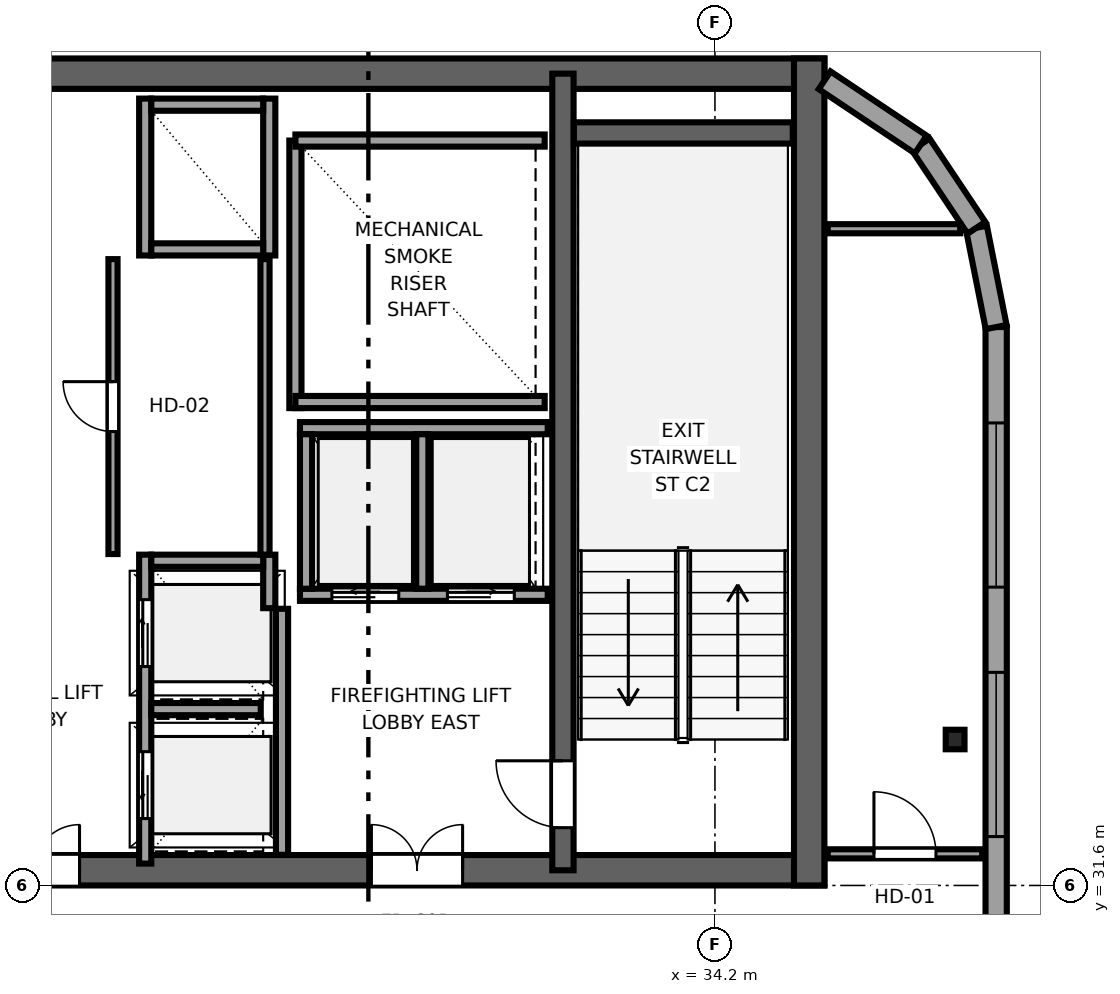
"""IFC4 building model, lengths in metres.
Left out: names, types, materials, properties, quantities, classifications, styles, units other than length and angle.
Written with IfcOpenShell. Run it as: python <this file> out.ifc"""

import sys

from ifc_helpers import new_model, si_unit, direction, frame, frame_2d, origin, origin_2d, place, context, subcontext, project, spatial, rectangle, i_section, extrude, source, transform, mapped, element, fill, save


model = new_model("IFC4")
c1 = context("Model", 3, precision=1e-05, world=origin(), true_north=direction((0.0, 1.0)))
c2 = subcontext(c1, "Body", "Model", "MODEL_VIEW")
j1 = project(units=[si_unit("LENGTHUNIT", "METRE"), si_unit("PLANEANGLEUNIT", "RADIAN")], contexts=[c1])
p1 = place(None, origin())
s1 = spatial("IfcSite", under=j1, at=p1, CompositionType="ELEMENT")
p2 = place(p1, origin())
s2 = spatial("IfcBuilding", under=s1, at=p2, CompositionType="ELEMENT")
p3 = place(p2, frame((0.0, 0.0, 266.5)))
s3 = spatial("IfcBuildingStorey", under=s2, at=p3, CompositionType="ELEMENT", Elevation=266.5)
p4 = place(p3, frame((10.0, 31.85, 0.0), z_axis=(0.0, 0.0, 1.0), x_axis=(1.0, 0.0, 0.0)))
e1 = element("IfcWall", 1, at=p4, inside=s3, PredefinedType="SHEAR", context=c2, shape_type="SweptSolid", body=[
    extrude(rectangle(XDim=26.0, YDim=0.5, at=frame_2d((13.0, 0.0))), origin(), (0.0, 0.0, 1.0), 3.55),
])
p5 = place(p4, frame((7.45, 0.0, 0.0), z_axis=(0.0, 0.0, 1.0), x_axis=(-1.0, 0.0, 0.0)))
e2 = element("IfcOpeningElement", 2, at=p5, cuts=e1, PredefinedType="OPENING", context=c2, shape_type="SweptSolid", body=[
    extrude(rectangle(XDim=1.5, YDim=2.04, at=frame_2d((0.75, 1.02))), frame((0.0, 0.26, 0.0), z_axis=(0.0, -1.0, 0.0), x_axis=(1.0, 0.0, 0.0)), (0.0, 0.0, 1.0), 0.52),
])
p6 = place(p4, frame((13.75, 0.0, 0.0), z_axis=(0.0, 0.0, 1.0), x_axis=(-1.0, 0.0, 0.0)))
e3 = element("IfcOpeningElement", 3, at=p6, cuts=e1, PredefinedType="OPENING", context=c2, shape_type="SweptSolid", body=[
    extrude(rectangle(XDim=1.5, YDim=2.04, at=frame_2d((0.75, 1.02))), frame((0.0, 0.26, 0.0), z_axis=(0.0, -1.0, 0.0), x_axis=(1.0, 0.0, 0.0)), (0.0, 0.0, 1.0), 0.52),
])
p7 = place(p4, frame((20.05, 0.0, 0.0), z_axis=(0.0, 0.0, 1.0), x_axis=(-1.0, 0.0, 0.0)))
e4 = element("IfcOpeningElement", 4, at=p7, cuts=e1, PredefinedType="OPENING", context=c2, shape_type="SweptSolid", body=[
    extrude(rectangle(XDim=1.5, YDim=2.04, at=frame_2d((0.75, 1.02))), frame((0.0, 0.26, 0.0), z_axis=(0.0, -1.0, 0.0), x_axis=(1.0, 0.0, 0.0)), (0.0, 0.0, 1.0), 0.52),
])
p8 = place(p3, frame((10.0, 44.95, 0.0), z_axis=(0.0, 0.0, 1.0), x_axis=(1.0, 0.0, 0.0)))
e5 = element("IfcWall", 5, at=p8, inside=s3, PredefinedType="SHEAR", context=c2, shape_type="SweptSolid", body=[
    extrude(rectangle(XDim=26.0, YDim=0.5, at=frame_2d((13.0, 0.0))), origin(), (0.0, 0.0, 1.0), 3.55),
])
p9 = place(p3, frame((35.75, 31.6, 0.0), z_axis=(0.0, 0.0, 1.0), x_axis=(0.0, 1.0, 0.0)))
e6 = element("IfcWall", 6, at=p9, inside=s3, PredefinedType="SHEAR", context=c2, shape_type="SweptSolid", body=[
    extrude(rectangle(XDim=13.6, YDim=0.5, at=frame_2d((6.8, 0.0))), origin(), (0.0, 0.0, 1.0), 3.55),
])
p10 = place(p3, frame((31.7, 31.85, 0.0), z_axis=(0.0, 0.0, 1.0), x_axis=(0.0, 1.0, 0.0)))
e7 = element("IfcWall", 7, at=p10, inside=s3, PredefinedType="SHEAR", context=c2, shape_type="SweptSolid", body=[
    extrude(rectangle(XDim=13.1, YDim=0.35, at=frame_2d((6.55, 0.0))), origin(), (0.0, 0.0, 1.0), 3.55),
])
p11 = place(p10, frame((1.8, 0.0, 0.0), z_axis=(0.0, 0.0, 1.0), x_axis=(-1.0, 0.0, 0.0)))
e8 = element("IfcOpeningElement", 8, at=p11, cuts=e7, PredefinedType="OPENING", context=c2, shape_type="SweptSolid", body=[
    extrude(rectangle(XDim=1.1, YDim=2.12, at=frame_2d((0.55, 1.06))), frame((0.0, 0.185, 0.0), z_axis=(0.0, -1.0, 0.0), x_axis=(1.0, 0.0, 0.0)), (0.0, 0.0, 1.0), 0.37),
])
p12 = place(p3, frame((31.88, 43.975, 0.0), z_axis=(0.0, 0.0, 1.0), x_axis=(1.0, 0.0, 0.0)))
e9 = element("IfcWall", 9, at=p12, inside=s3, PredefinedType="SHEAR", context=c2, shape_type="SweptSolid", body=[
    extrude(rectangle(XDim=3.6, YDim=0.35, at=frame_2d((1.8, 0.0))), origin(), (0.0, 0.0, 1.0), 3.55),
])
m1 = source(origin(), c2, "Body", "SweptSolid", [
    extrude(i_section(OverallWidth=0.309, OverallDepth=0.321, WebThickness=0.014, FlangeThickness=0.022, FilletRadius=0.017, at=origin_2d()), origin(), (0.0, 0.0, 1.0), 3.55),
])
p13 = place(p3, frame((38.15, 34.0, 0.0), z_axis=(0.0, 0.0, 1.0), x_axis=(1.0, 0.0, 0.0)))
e10 = element("IfcColumn", 10, at=p13, inside=s3, PredefinedType="COLUMN", context=c2, shape_type="MappedRepresentation", body=[
    mapped(m1, transform((0.0, 0.0, 0.0), x_axis=(1.0, 0.0, 0.0), y_axis=(0.0, 1.0, 0.0), z_axis=(0.0, 0.0, 1.0), scale=1.0)),
])
p14 = place(p3, frame((38.825, 7.017, 0.0), z_axis=(0.0, 0.0, 1.0), x_axis=(0.0, 1.0, 0.0)))
e11 = element("IfcWall", 11, at=p14, inside=s3, PredefinedType="SOLIDWALL", context=c2, shape_type="SweptSolid", body=[
    extrude(rectangle(XDim=33.766, YDim=0.35, at=frame_2d((16.883, 0.0))), origin(), (0.0, 0.0, 1.0), 3.25),
])
p15 = place(p14, frame((1.576, 0.0, 0.68)))
e12 = element("IfcOpeningElement", 12, at=p15, cuts=e11, PredefinedType="OPENING", context=c2, shape_type="SweptSolid", body=[
    extrude(rectangle(XDim=2.7, YDim=1.95, at=frame_2d((1.35, 0.975))), frame((0.0, 0.185, 0.0), z_axis=(0.0, -1.0, 0.0), x_axis=(1.0, 0.0, 0.0)), (0.0, 0.0, 1.0), 0.37),
])
p16 = place(p14, frame((6.228, 0.0, 0.68)))
e13 = element("IfcOpeningElement", 13, at=p16, cuts=e11, PredefinedType="OPENING", context=c2, shape_type="SweptSolid", body=[
    extrude(rectangle(XDim=2.7, YDim=1.95, at=frame_2d((1.35, 0.975))), frame((0.0, 0.185, 0.0), z_axis=(0.0, -1.0, 0.0), x_axis=(1.0, 0.0, 0.0)), (0.0, 0.0, 1.0), 0.37),
])
p17 = place(p14, frame((10.881, 0.0, 0.68)))
e14 = element("IfcOpeningElement", 14, at=p17, cuts=e11, PredefinedType="OPENING", context=c2, shape_type="SweptSolid", body=[
    extrude(rectangle(XDim=2.7, YDim=1.95, at=frame_2d((1.35, 0.975))), frame((0.0, 0.185, 0.0), z_axis=(0.0, -1.0, 0.0), x_axis=(1.0, 0.0, 0.0)), (0.0, 0.0, 1.0), 0.37),
])
p18 = place(p14, frame((15.533, 0.0, 0.68)))
e15 = element("IfcOpeningElement", 15, at=p18, cuts=e11, PredefinedType="OPENING", context=c2, shape_type="SweptSolid", body=[
    extrude(rectangle(XDim=2.7, YDim=1.95, at=frame_2d((1.35, 0.975))), frame((0.0, 0.185, 0.0), z_axis=(0.0, -1.0, 0.0), x_axis=(1.0, 0.0, 0.0)), (0.0, 0.0, 1.0), 0.37),
])
p19 = place(p14, frame((20.185, 0.0, 0.68)))
e16 = element("IfcOpeningElement", 16, at=p19, cuts=e11, PredefinedType="OPENING", context=c2, shape_type="SweptSolid", body=[
    extrude(rectangle(XDim=2.7, YDim=1.95, at=frame_2d((1.35, 0.975))), frame((0.0, 0.185, 0.0), z_axis=(0.0, -1.0, 0.0), x_axis=(1.0, 0.0, 0.0)), (0.0, 0.0, 1.0), 0.37),
])
p20 = place(p14, frame((25.387, 0.0, 0.68)))
e17 = element("IfcOpeningElement", 17, at=p20, cuts=e11, PredefinedType="OPENING", context=c2, shape_type="SweptSolid", body=[
    extrude(rectangle(XDim=2.7, YDim=1.95, at=frame_2d((1.35, 0.975))), frame((0.0, 0.185, 0.0), z_axis=(0.0, -1.0, 0.0), x_axis=(1.0, 0.0, 0.0)), (0.0, 0.0, 1.0), 0.37),
])
p21 = place(p14, frame((29.489, 0.0, 0.68)))
e18 = element("IfcOpeningElement", 18, at=p21, cuts=e11, PredefinedType="OPENING", context=c2, shape_type="SweptSolid", body=[
    extrude(rectangle(XDim=2.7, YDim=1.95, at=frame_2d((1.35, 0.975))), frame((0.0, 0.185, 0.0), z_axis=(0.0, -1.0, 0.0), x_axis=(1.0, 0.0, 0.0)), (0.0, 0.0, 1.0), 0.37),
])
p22 = place(p3, frame((38.825, 40.783, 0.0), z_axis=(0.0, 0.0, 1.0), x_axis=(-0.195044345786, 0.980794424524, 0.0)))
e19 = element("IfcWall", 19, at=p22, inside=s3, PredefinedType="SOLIDWALL", context=c2, shape_type="SweptSolid", body=[
    extrude(rectangle(XDim=1.665, YDim=0.35, at=frame_2d((0.833, 0.0))), origin(), (0.0, 0.0, 1.0), 3.25),
])
p23 = place(p3, frame((38.5, 42.416, 0.0), z_axis=(0.0, 0.0, 1.0), x_axis=(-0.555520825599, 0.831502623162, 0.0)))
e20 = element("IfcWall", 20, at=p23, inside=s3, PredefinedType="SOLIDWALL", context=c2, shape_type="SweptSolid", body=[
    extrude(rectangle(XDim=1.647, YDim=0.35, at=frame_2d((0.824, 0.0))), origin(), (0.0, 0.0, 1.0), 3.25),
])
p24 = place(p3, frame((37.585, 43.785, 0.0), z_axis=(0.0, 0.0, 1.0), x_axis=(-0.831516639465, 0.555499845448, 0.0)))
e21 = element("IfcWall", 21, at=p24, inside=s3, PredefinedType="SOLIDWALL", context=c2, shape_type="SweptSolid", body=[
    extrude(rectangle(XDim=1.902, YDim=0.35, at=frame_2d((0.951, 0.0))), origin(), (0.0, 0.0, 1.0), 3.25),
])
p25 = place(p3, frame((27.3, 39.45, 0.0), z_axis=(0.0, 0.0, 1.0), x_axis=(0.0, 1.0, 0.0)))
e22 = element("IfcWall", 22, at=p25, inside=s3, PredefinedType="SOLIDWALL", context=c2, shape_type="SweptSolid", body=[
    extrude(rectangle(XDim=4.4, YDim=0.2, at=frame_2d((2.2, 0.0))), origin(), (0.0, 0.0, 1.0), 3.25),
])
for number, where, z_axis, x_axis in (
    (23, (27.3, 39.55, 0.0), (0.0, 0.0, 1.0), (1.0, 0.0, 0.0)),
    (24, (27.3, 43.85, 0.0), (0.0, 0.0, 1.0), (1.0, 0.0, 0.0)),
):
    element("IfcWall", number, at=place(p3, frame(where, z_axis=z_axis, x_axis=x_axis)), inside=s3, PredefinedType="SOLIDWALL", context=c2, shape_type="SweptSolid", body=[
        extrude(rectangle(XDim=4.1, YDim=0.2, at=frame_2d((2.05, 0.0))), origin(), (0.0, 0.0, 1.0), 3.25),
    ])
p26 = place(p3, frame((27.08, 32.104, 0.0), z_axis=(0.0, 0.0, 1.0), x_axis=(0.0, 1.0, 0.0)))
e25 = element("IfcWall", 25, at=p26, inside=s3, PredefinedType="SOLIDWALL", context=c2, shape_type="SweptSolid", body=[
    extrude(rectangle(XDim=4.046, YDim=0.2, at=frame_2d((2.023, 0.0))), origin(), (0.0, 0.0, 1.0), 3.25),
])
p27 = place(p3, frame((27.375, 36.38, 0.0), z_axis=(0.0, 0.0, 1.0), x_axis=(1.0, 0.0, 0.0)))
e26 = element("IfcWall", 26, at=p27, inside=s3, PredefinedType="SOLIDWALL", context=c2, shape_type="SweptSolid", body=[
    extrude(rectangle(XDim=4.075, YDim=0.2, at=frame_2d((2.038, 0.0))), origin(), (0.0, 0.0, 1.0), 3.25),
])
p28 = place(p27, frame((0.525, 0.0, 0.0)))
e27 = element("IfcOpeningElement", 27, at=p28, cuts=e26, PredefinedType="OPENING", context=c2, shape_type="SweptSolid", body=[
    extrude(rectangle(XDim=1.1, YDim=2.12, at=frame_2d((0.55, 1.06))), frame((0.0, 0.11, 0.0), z_axis=(0.0, -1.0, 0.0), x_axis=(1.0, 0.0, 0.0)), (0.0, 0.0, 1.0), 0.22),
])
p29 = place(p27, frame((2.425, 0.0, 0.0)))
e28 = element("IfcOpeningElement", 28, at=p29, cuts=e26, PredefinedType="OPENING", context=c2, shape_type="SweptSolid", body=[
    extrude(rectangle(XDim=1.1, YDim=2.12, at=frame_2d((0.55, 1.06))), frame((0.0, 0.11, 0.0), z_axis=(0.0, -1.0, 0.0), x_axis=(1.0, 0.0, 0.0)), (0.0, 0.0, 1.0), 0.22),
])
p30 = place(p3, frame((27.375, 39.12, 0.0), z_axis=(0.0, 0.0, 1.0), x_axis=(1.0, 0.0, 0.0)))
e29 = element("IfcWall", 29, at=p30, inside=s3, PredefinedType="SOLIDWALL", context=c2, shape_type="SweptSolid", body=[
    extrude(rectangle(XDim=4.075, YDim=0.2, at=frame_2d((2.038, 0.0))), origin(), (0.0, 0.0, 1.0), 3.25),
])
for number, where, z_axis, x_axis in (
    (30, (27.475, 36.48, 0.0), (0.0, 0.0, 1.0), (0.0, 1.0, 0.0)),
    (31, (29.387, 36.48, 0.0), (0.0, 0.0, 1.0), (0.0, 1.0, 0.0)),
):
    element("IfcWall", number, at=place(p3, frame(where, z_axis=z_axis, x_axis=x_axis)), inside=s3, PredefinedType="SOLIDWALL", context=c2, shape_type="SweptSolid", body=[
        extrude(rectangle(XDim=2.54, YDim=0.2, at=frame_2d((1.27, 0.0))), origin(), (0.0, 0.0, 1.0), 3.25),
    ])
p31 = place(p3, frame((24.83, 31.96, 0.0), z_axis=(0.0, 0.0, 1.0), x_axis=(0.0, 1.0, 0.0)))
e32 = element("IfcWall", 32, at=p31, inside=s3, PredefinedType="SOLIDWALL", context=c2, shape_type="SweptSolid", body=[
    extrude(rectangle(XDim=5.08, YDim=0.2, at=frame_2d((2.54, 0.0))), origin(), (0.0, 0.0, 1.0), 3.25),
])
p32 = place(p31, frame((0.74, 0.0, 0.0)))
e33 = element("IfcOpeningElement", 33, at=p32, cuts=e32, PredefinedType="OPENING", context=c2, shape_type="SweptSolid", body=[
    extrude(rectangle(XDim=1.1, YDim=2.12, at=frame_2d((0.55, 1.06))), frame((0.0, 0.11, 0.0), z_axis=(0.0, -1.0, 0.0), x_axis=(1.0, 0.0, 0.0)), (0.0, 0.0, 1.0), 0.22),
])
p33 = place(p31, frame((3.24, 0.0, 0.0)))
e34 = element("IfcOpeningElement", 34, at=p33, cuts=e32, PredefinedType="OPENING", context=c2, shape_type="SweptSolid", body=[
    extrude(rectangle(XDim=1.1, YDim=2.12, at=frame_2d((0.55, 1.06))), frame((0.0, 0.11, 0.0), z_axis=(0.0, -1.0, 0.0), x_axis=(1.0, 0.0, 0.0)), (0.0, 0.0, 1.0), 0.22),
])
p34 = place(p3, frame((26.87, 36.16, 0.0), z_axis=(0.0, 0.0, 1.0), x_axis=(0.0, 1.0, 0.0)))
e35 = element("IfcWall", 35, at=p34, inside=s3, PredefinedType="SOLIDWALL", context=c2, shape_type="SweptSolid", body=[
    extrude(rectangle(XDim=0.88, YDim=0.2, at=frame_2d((0.44, 0.0))), origin(), (0.0, 0.0, 1.0), 3.25),
])
p35 = place(p3, frame((24.93, 36.94, 0.0), z_axis=(0.0, 0.0, 1.0), x_axis=(1.0, 0.0, 0.0)))
e36 = element("IfcWall", 36, at=p35, inside=s3, PredefinedType="SOLIDWALL", context=c2, shape_type="SweptSolid", body=[
    extrude(rectangle(XDim=1.84, YDim=0.2, at=frame_2d((0.92, 0.0))), origin(), (0.0, 0.0, 1.0), 3.25),
])
p36 = place(p3, frame((24.93, 34.5, 0.0), z_axis=(0.0, 0.0, 1.0), x_axis=(1.0, 0.0, 0.0)))
e37 = element("IfcWall", 37, at=p36, inside=s3, PredefinedType="SOLIDWALL", context=c2, shape_type="SweptSolid", body=[
    extrude(rectangle(XDim=1.8, YDim=0.2, at=frame_2d((0.9, 0.0))), origin(), (0.0, 0.0, 1.0), 3.25),
])
for number, where, z_axis, x_axis in (
    (38, (24.83, 41.96, 0.0), (0.0, 0.0, 1.0), (0.0, 1.0, 0.0)),
    (39, (26.87, 41.96, 0.0), (0.0, 0.0, 1.0), (0.0, 1.0, 0.0)),
):
    element("IfcWall", number, at=place(p3, frame(where, z_axis=z_axis, x_axis=x_axis)), inside=s3, PredefinedType="SOLIDWALL", context=c2, shape_type="SweptSolid", body=[
        extrude(rectangle(XDim=2.58, YDim=0.2, at=frame_2d((1.29, 0.0))), origin(), (0.0, 0.0, 1.0), 3.25),
    ])
for number, where, z_axis, x_axis in (
    (40, (24.93, 42.06, 0.0), (0.0, 0.0, 1.0), (1.0, 0.0, 0.0)),
    (41, (24.93, 44.44, 0.0), (0.0, 0.0, 1.0), (1.0, 0.0, 0.0)),
):
    element("IfcWall", number, at=place(p3, frame(where, z_axis=z_axis, x_axis=x_axis)), inside=s3, PredefinedType="SOLIDWALL", context=c2, shape_type="SweptSolid", body=[
        extrude(rectangle(XDim=1.84, YDim=0.2, at=frame_2d((0.92, 0.0))), origin(), (0.0, 0.0, 1.0), 3.25),
    ])
p37 = place(p3, frame((24.3, 37.05, 0.0), z_axis=(0.0, 0.0, 1.0), x_axis=(0.0, 1.0, 0.0)))
e42 = element("IfcWall", 42, at=p37, inside=s3, PredefinedType="PARTITIONING", context=c2, shape_type="SweptSolid", body=[
    extrude(rectangle(XDim=4.85, YDim=0.15, at=frame_2d((2.425, 0.0))), origin(), (0.0, 0.0, 1.0), 3.25),
])
p38 = place(p37, frame((2.015, 0.0, 0.0)))
e43 = element("IfcOpeningElement", 43, at=p38, cuts=e42, PredefinedType="OPENING", context=c2, shape_type="SweptSolid", body=[
    extrude(rectangle(XDim=0.82, YDim=2.01, at=frame_2d((0.41, 1.005))), frame((0.0, 0.085, 0.0), z_axis=(0.0, -1.0, 0.0), x_axis=(1.0, 0.0, 0.0)), (0.0, 0.0, 1.0), 0.17),
])
p39 = place(p3, frame((26.8, 37.04, 0.0), z_axis=(0.0, 0.0, 1.0), x_axis=(0.0, 1.0, 0.0)))
e44 = element("IfcWall", 44, at=p39, inside=s3, PredefinedType="PARTITIONING", context=c2, shape_type="SweptSolid", body=[
    extrude(rectangle(XDim=4.86, YDim=0.15, at=frame_2d((2.43, 0.0))), origin(), (0.0, 0.0, 1.0), 3.25),
])
p40 = place(p3, frame((36.055, 32.12, 0.0), z_axis=(0.0, 0.0, 1.0), x_axis=(1.0, 0.0, 0.0)))
e45 = element("IfcWall", 45, at=p40, inside=s3, PredefinedType="PARTITIONING", context=c2, shape_type="SweptSolid", body=[
    extrude(rectangle(XDim=2.54, YDim=0.15, at=frame_2d((1.27, 0.0))), origin(), (0.0, 0.0, 1.0), 3.25),
])
p41 = place(p40, frame((0.76, 0.0, 0.0)))
e46 = element("IfcOpeningElement", 46, at=p41, cuts=e45, PredefinedType="OPENING", context=c2, shape_type="SweptSolid", body=[
    extrude(rectangle(XDim=1.02, YDim=2.03, at=frame_2d((0.51, 1.015))), frame((0.0, 0.085, 0.0), z_axis=(0.0, -1.0, 0.0), x_axis=(1.0, 0.0, 0.0)), (0.0, 0.0, 1.0), 0.17),
])
p42 = place(p3, frame((36.055, 42.4, 0.0), z_axis=(0.0, 0.0, 1.0), x_axis=(1.0, 0.0, 0.0)))
e47 = element("IfcWall", 47, at=p42, inside=s3, PredefinedType="PARTITIONING", context=c2, shape_type="SweptSolid", body=[
    extrude(rectangle(XDim=2.179, YDim=0.15, at=frame_2d((1.089, 0.0))), origin(), (0.0, 0.0, 1.0), 3.25),
])
m2 = source(origin(), c2, "Body", "SweptSolid", [
    extrude(rectangle(XDim=2.7, YDim=1.95, at=frame_2d((1.35, 0.975))), frame((0.0, 0.09, 0.0), z_axis=(0.0, -1.0, 0.0), x_axis=(1.0, 0.0, 0.0)), (0.0, 0.0, 1.0), 0.06),
])
p43 = place(p20, origin())
e48 = element("IfcWindow", 48, at=p43, inside=s3, PartitioningType="TRIPLE_PANEL_HORIZONTAL", PredefinedType="WINDOW", context=c2, shape_type="MappedRepresentation", body=[
    mapped(m2, transform((0.0, 0.0, 0.0), x_axis=(1.0, 0.0, 0.0), y_axis=(0.0, 1.0, 0.0), z_axis=(0.0, 0.0, 1.0), scale=1.0)),
])
fill(e17, e48)
p44 = place(p21, origin())
e49 = element("IfcWindow", 49, at=p44, inside=s3, PartitioningType="TRIPLE_PANEL_HORIZONTAL", PredefinedType="WINDOW", context=c2, shape_type="MappedRepresentation", body=[
    mapped(m2, transform((0.0, 0.0, 0.0), x_axis=(1.0, 0.0, 0.0), y_axis=(0.0, 1.0, 0.0), z_axis=(0.0, 0.0, 1.0), scale=1.0)),
])
fill(e18, e49)
m3 = source(origin(), c2, "Body", "SweptSolid", [
    extrude(rectangle(XDim=1.1, YDim=2.12, at=frame_2d((0.55, 1.06))), frame((0.0, 0.025, 0.0), z_axis=(0.0, -1.0, 0.0), x_axis=(1.0, 0.0, 0.0)), (0.0, 0.0, 1.0), 0.05),
])
p45 = place(p11, origin())
e50 = element("IfcDoor", 50, at=p45, inside=s3, OperationType="SINGLE_SWING_RIGHT", PredefinedType="DOOR", context=c2, shape_type="MappedRepresentation", body=[
    mapped(m3, transform((0.0, 0.0, 0.0), x_axis=(1.0, 0.0, 0.0), y_axis=(0.0, 1.0, 0.0), z_axis=(0.0, 0.0, 1.0), scale=1.0)),
])
fill(e8, e50)
m4 = source(origin(), c2, "Body", "SweptSolid", [
    extrude(rectangle(XDim=1.5, YDim=2.04, at=frame_2d((0.75, 1.02))), frame((0.0, 0.025, 0.0), z_axis=(0.0, -1.0, 0.0), x_axis=(1.0, 0.0, 0.0)), (0.0, 0.0, 1.0), 0.05),
])
p46 = place(p6, origin())
e51 = element("IfcDoor", 51, at=p46, inside=s3, OperationType="DOUBLE_DOOR_SINGLE_SWING", PredefinedType="DOOR", context=c2, shape_type="MappedRepresentation", body=[
    mapped(m4, transform((0.0, 0.0, 0.0), x_axis=(1.0, 0.0, 0.0), y_axis=(0.0, 1.0, 0.0), z_axis=(0.0, 0.0, 1.0), scale=1.0)),
])
fill(e3, e51)
p47 = place(p7, origin())
e52 = element("IfcDoor", 52, at=p47, inside=s3, OperationType="DOUBLE_DOOR_SINGLE_SWING", PredefinedType="DOOR", context=c2, shape_type="MappedRepresentation", body=[
    mapped(m4, transform((0.0, 0.0, 0.0), x_axis=(1.0, 0.0, 0.0), y_axis=(0.0, 1.0, 0.0), z_axis=(0.0, 0.0, 1.0), scale=1.0)),
])
fill(e4, e52)
m5 = source(origin(), c2, "Body", "SweptSolid", [
    extrude(rectangle(XDim=1.1, YDim=2.12, at=frame_2d((0.55, 1.06))), frame((0.0, 0.025, 0.0), z_axis=(0.0, -1.0, 0.0), x_axis=(1.0, 0.0, 0.0)), (0.0, 0.0, 1.0), 0.05),
])
p48 = place(p28, origin())
e53 = element("IfcDoor", 53, at=p48, inside=s3, OperationType="SLIDING_TO_LEFT", PredefinedType="DOOR", context=c2, shape_type="MappedRepresentation", body=[
    mapped(m5, transform((0.0, 0.0, 0.0), x_axis=(1.0, 0.0, 0.0), y_axis=(0.0, 1.0, 0.0), z_axis=(0.0, 0.0, 1.0), scale=1.0)),
])
fill(e27, e53)
p49 = place(p29, origin())
e54 = element("IfcDoor", 54, at=p49, inside=s3, OperationType="SLIDING_TO_RIGHT", PredefinedType="DOOR", context=c2, shape_type="MappedRepresentation", body=[
    mapped(m5, transform((0.0, 0.0, 0.0), x_axis=(1.0, 0.0, 0.0), y_axis=(0.0, 1.0, 0.0), z_axis=(0.0, 0.0, 1.0), scale=1.0)),
])
fill(e28, e54)
p50 = place(p32, origin())
e55 = element("IfcDoor", 55, at=p50, inside=s3, OperationType="SLIDING_TO_LEFT", PredefinedType="DOOR", context=c2, shape_type="MappedRepresentation", body=[
    mapped(m5, transform((0.0, 0.0, 0.0), x_axis=(1.0, 0.0, 0.0), y_axis=(0.0, 1.0, 0.0), z_axis=(0.0, 0.0, 1.0), scale=1.0)),
])
fill(e33, e55)
p51 = place(p33, origin())
e56 = element("IfcDoor", 56, at=p51, inside=s3, OperationType="SLIDING_TO_RIGHT", PredefinedType="DOOR", context=c2, shape_type="MappedRepresentation", body=[
    mapped(m5, transform((0.0, 0.0, 0.0), x_axis=(1.0, 0.0, 0.0), y_axis=(0.0, 1.0, 0.0), z_axis=(0.0, 0.0, 1.0), scale=1.0)),
])
fill(e34, e56)
m6 = source(origin(), c2, "Body", "SweptSolid", [
    extrude(rectangle(XDim=0.82, YDim=2.01, at=frame_2d((0.41, 1.005))), frame((0.0, 0.025, 0.0), z_axis=(0.0, -1.0, 0.0), x_axis=(1.0, 0.0, 0.0)), (0.0, 0.0, 1.0), 0.05),
])
p52 = place(p38, origin())
e57 = element("IfcDoor", 57, at=p52, inside=s3, OperationType="SINGLE_SWING_RIGHT", PredefinedType="DOOR", context=c2, shape_type="MappedRepresentation", body=[
    mapped(m6, transform((0.0, 0.0, 0.0), x_axis=(1.0, 0.0, 0.0), y_axis=(0.0, 1.0, 0.0), z_axis=(0.0, 0.0, 1.0), scale=1.0)),
])
fill(e43, e57)
m7 = source(origin(), c2, "Body", "SweptSolid", [
    extrude(rectangle(XDim=1.02, YDim=2.03, at=frame_2d((0.51, 1.015))), frame((0.0, 0.025, 0.0), z_axis=(0.0, -1.0, 0.0), x_axis=(1.0, 0.0, 0.0)), (0.0, 0.0, 1.0), 0.05),
])
p53 = place(p41, origin())
e58 = element("IfcDoor", 58, at=p53, inside=s3, OperationType="SINGLE_SWING_LEFT", PredefinedType="DOOR", context=c2, shape_type="MappedRepresentation", body=[
    mapped(m7, transform((0.0, 0.0, 0.0), x_axis=(1.0, 0.0, 0.0), y_axis=(0.0, 1.0, 0.0), z_axis=(0.0, 0.0, 1.0), scale=1.0)),
])
fill(e46, e58)
save(model, sys.argv[1])
